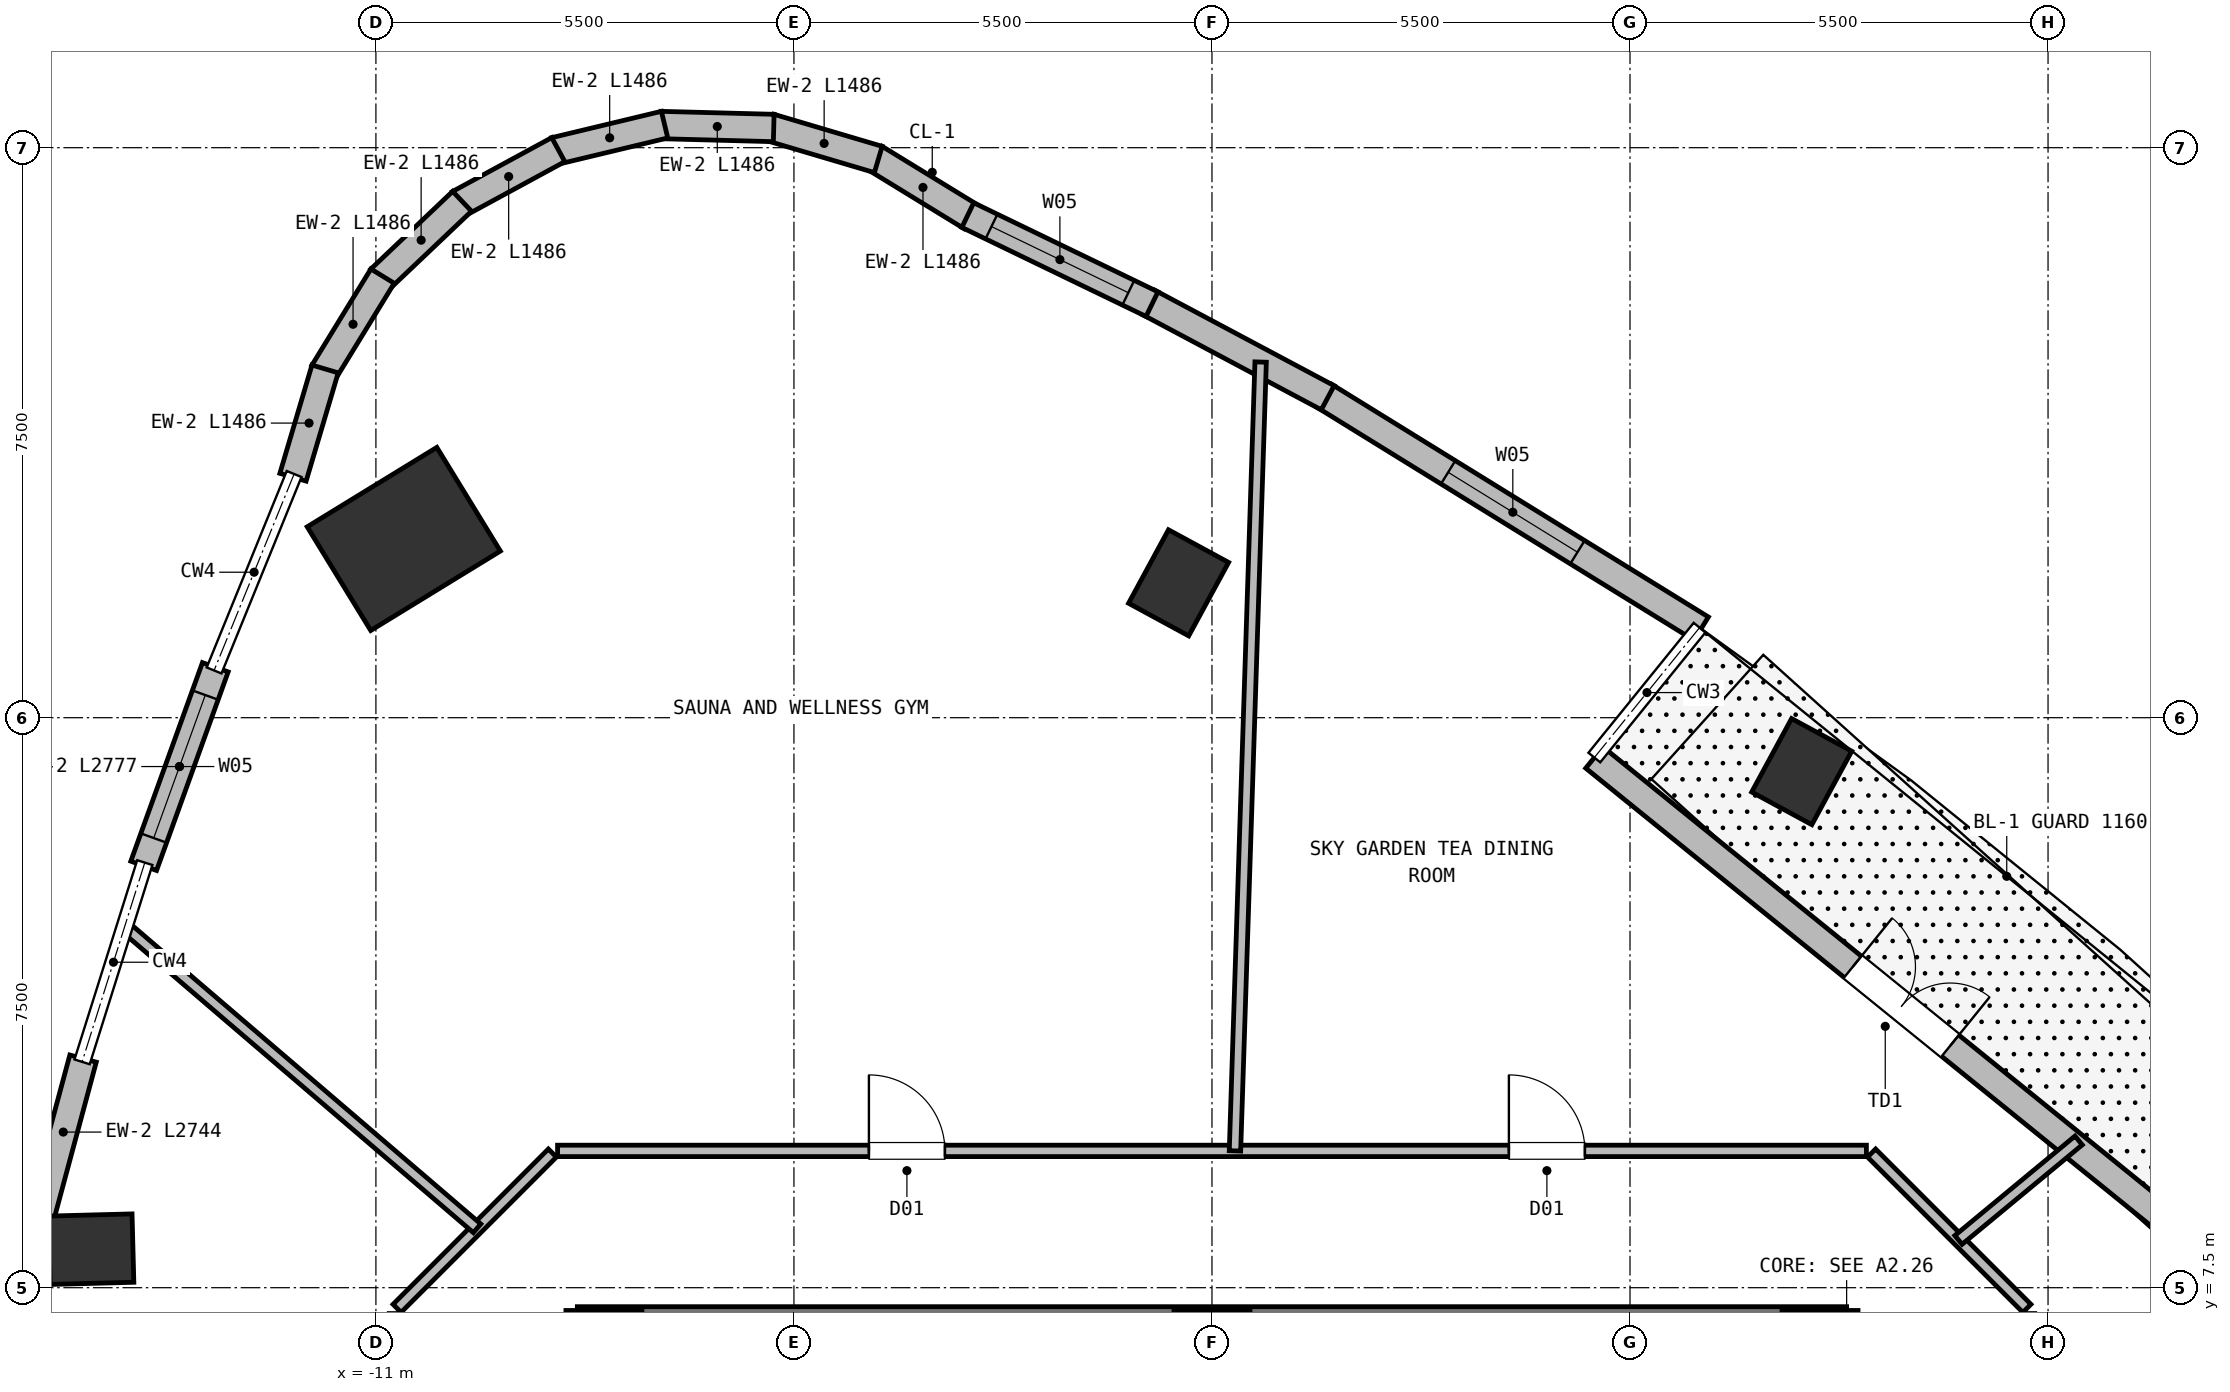
"""IFC4 building model, lengths in metres.
Left out: names, types, materials, properties, quantities, classifications, styles, units other than length and angle.
Written with IfcOpenShell. Run it as: python <this file> out.ifc"""

import sys

from ifc_helpers import new_model, si_unit, direction, frame, frame_2d, origin, origin_2d, place, context, subcontext, project, spatial, rectangle, extrude, element, fill, save


model = new_model("IFC4")
c1 = context("Model", 3, precision=1e-05, world=origin(), true_north=direction((0.0, 1.0)))
c2 = subcontext(c1, "Body", "Model", "MODEL_VIEW")
j1 = project(units=[si_unit("LENGTHUNIT", "METRE"), si_unit("PLANEANGLEUNIT", "RADIAN")], contexts=[c1])
p1 = place(None, origin())
s1 = spatial("IfcSite", under=j1, at=p1, CompositionType="ELEMENT")
p2 = place(p1, origin())
s2 = spatial("IfcBuilding", under=s1, at=p2, CompositionType="ELEMENT")
p3 = place(p2, frame((0.0, 0.0, 92.75)))
s3 = spatial("IfcBuildingStorey", under=s2, at=p3, CompositionType="ELEMENT", Elevation=92.75)
for number, where, z_axis, x_axis in (
    (1, (8.0, 6.6, 0.0), (0.0, 0.0, 1.0), (1.0, 0.0, 0.0)),
    (2, (0.0, 6.6, 0.0), (0.0, 0.0, 1.0), (1.0, 0.0, 0.0)),
    (3, (-8.0, 6.6, 0.0), (0.0, 0.0, 1.0), (1.0, 0.0, 0.0)),
):
    element("IfcColumn", number, at=place(p3, frame(where, z_axis=z_axis, x_axis=x_axis)), inside=s3, PredefinedType="COLUMN", context=c2, shape_type="SweptSolid", body=[
        extrude(rectangle(XDim=1.0, YDim=1.2, at=origin_2d()), origin(), (0.0, 0.0, 1.0), 4.5),
    ])
p4 = place(p3, frame((-8.35, 6.95, 0.0), z_axis=(0.0, 0.0, 1.0), x_axis=(1.0, 0.0, 0.0)))
e4 = element("IfcWall", 4, at=p4, inside=s3, PredefinedType="SHEAR", context=c2, shape_type="SweptSolid", body=[
    extrude(rectangle(XDim=16.7, YDim=0.6, at=frame_2d((8.35, 0.0))), origin(), (0.0, 0.0, 1.0), 4.25),
])
p5 = place(p3, frame((-10.633, 17.352, 0.0), z_axis=(0.0, 0.0, 1.0), x_axis=(-0.522498564716, 0.852640164354, 0.0)))
e5 = element("IfcColumn", 5, at=p5, inside=s3, PredefinedType="COLUMN", context=c2, shape_type="SweptSolid", body=[
    extrude(rectangle(XDim=1.6, YDim=2.0, at=origin_2d()), origin(), (0.0, 0.0, 1.0), 4.5),
])
for number, where, z_axis, x_axis in (
    (6, (-14.747, 8.007, 0.0), (0.0, 0.0, 1.0), (-0.026, 1.0, 0.0)),
    (7, (7.759, 14.29, 0.0), (0.0, 0.0, 1.0), (-0.879, 0.477, 0.0)),
    (8, (-0.439, 16.774, 0.0), (0.0, 0.0, 1.0), (-0.879, 0.477, 0.0)),
):
    element("IfcColumn", number, at=place(p3, frame(where, z_axis=z_axis, x_axis=x_axis)), inside=s3, PredefinedType="COLUMN", context=c2, shape_type="SweptSolid", body=[
        extrude(rectangle(XDim=0.9, YDim=1.1, at=origin_2d()), origin(), (0.0, 0.0, 1.0), 4.5),
    ])
p6 = place(p3, frame((5.031, 14.476, 0.0), z_axis=(0.0, 0.0, 1.0), x_axis=(0.777144818157, -0.629321802905, 0.0)))
e9 = element("IfcWall", 9, at=p6, inside=s3, PredefinedType="SOLIDWALL", context=c2, shape_type="SweptSolid", body=[
    extrude(rectangle(XDim=10.4, YDim=0.36, at=frame_2d((5.2, 0.0))), origin(), (0.0, 0.0, 1.0), 4.25),
])
p7 = place(p6, frame((4.375, 0.0, 0.0)))
e10 = element("IfcOpeningElement", 10, at=p7, cuts=e9, PredefinedType="OPENING", context=c2, shape_type="SweptSolid", body=[
    extrude(rectangle(XDim=1.65, YDim=2.25, at=frame_2d((0.825, 1.125))), frame((0.0, 0.19, 0.0), z_axis=(0.0, -1.0, 0.0), x_axis=(1.0, 0.0, 0.0)), (0.0, 0.0, 1.0), 0.38),
])
for number, where, z_axis, x_axis in (
    (11, (-4.436, 22.365, 0.0), (0.0, 0.0, 1.0), (0.853, -0.523, 0.0)),
    (12, (-5.815, 22.767, 0.0), (0.0, 0.0, 1.0), (0.959, -0.284, 0.0)),
):
    element("IfcWall", number, at=place(p3, frame(where, z_axis=z_axis, x_axis=x_axis)), inside=s3, PredefinedType="SOLIDWALL", context=c2, shape_type="SweptSolid", body=[
        extrude(rectangle(XDim=1.486, YDim=0.36, at=frame_2d((0.743, 0.0))), origin(), (0.0, 0.0, 1.0), 4.25),
    ])
p8 = place(p3, frame((-7.251, 22.798, 0.0), z_axis=(0.0, 0.0, 1.0), x_axis=(0.999658566483, -0.026129494011, 0.0)))
e13 = element("IfcWall", 13, at=p8, inside=s3, PredefinedType="SOLIDWALL", context=c2, shape_type="SweptSolid", body=[
    extrude(rectangle(XDim=1.486, YDim=0.36, at=frame_2d((0.743, 0.0))), origin(), (0.0, 0.0, 1.0), 4.25),
])
p9 = place(p3, frame((-8.647, 22.457, 0.0), z_axis=(0.0, 0.0, 1.0), x_axis=(0.972399232605, 0.233323235941, 0.0)))
e14 = element("IfcWall", 14, at=p9, inside=s3, PredefinedType="SOLIDWALL", context=c2, shape_type="SweptSolid", body=[
    extrude(rectangle(XDim=1.486, YDim=0.36, at=frame_2d((0.743, 0.0))), origin(), (0.0, 0.0, 1.0), 4.25),
])
p10 = place(p3, frame((-9.906, 21.765, 0.0), z_axis=(0.0, 0.0, 1.0), x_axis=(0.878867212286, 0.477066476677, 0.0)))
e15 = element("IfcWall", 15, at=p10, inside=s3, PredefinedType="SOLIDWALL", context=c2, shape_type="SweptSolid", body=[
    extrude(rectangle(XDim=1.486, YDim=0.36, at=frame_2d((0.743, 0.0))), origin(), (0.0, 0.0, 1.0), 4.25),
])
for number, where, z_axis, x_axis in (
    (16, (-10.944, 20.771, 0.0), (0.0, 0.0, 1.0), (0.725, 0.688, 0.0)),
    (17, (-11.689, 19.543, 0.0), (0.0, 0.0, 1.0), (0.523, 0.853, 0.0)),
    (18, (-12.091, 18.164, 0.0), (0.0, 0.0, 1.0), (0.284, 0.959, 0.0)),
):
    element("IfcWall", number, at=place(p3, frame(where, z_axis=z_axis, x_axis=x_axis)), inside=s3, PredefinedType="SOLIDWALL", context=c2, shape_type="SweptSolid", body=[
        extrude(rectangle(XDim=1.486, YDim=0.36, at=frame_2d((0.743, 0.0))), origin(), (0.0, 0.0, 1.0), 4.25),
    ])
p11 = place(p3, frame((-14.055, 13.051, 0.0), z_axis=(0.0, 0.0, 1.0), x_axis=(0.339208104653, 0.940711359418, 0.0)))
e19 = element("IfcWall", 19, at=p11, inside=s3, PredefinedType="SOLIDWALL", context=c2, shape_type="SweptSolid", body=[
    extrude(rectangle(XDim=2.777, YDim=0.36, at=frame_2d((1.389, 0.0))), origin(), (0.0, 0.0, 1.0), 4.25),
])
p12 = place(p11, frame((0.389, 0.0, 0.72)))
e20 = element("IfcOpeningElement", 20, at=p12, cuts=e19, PredefinedType="OPENING", context=c2, shape_type="SweptSolid", body=[
    extrude(rectangle(XDim=2.0, YDim=2.15, at=frame_2d((1.0, 1.075))), frame((0.0, 0.19, 0.0), z_axis=(0.0, -1.0, 0.0), x_axis=(1.0, 0.0, 0.0)), (0.0, 0.0, 1.0), 0.38),
])
p13 = place(p3, frame((-15.566, 7.865, 0.0), z_axis=(0.0, 0.0, 1.0), x_axis=(0.259976664172, 0.965614899474, 0.0)))
e21 = element("IfcWall", 21, at=p13, inside=s3, PredefinedType="SOLIDWALL", context=c2, shape_type="SweptSolid", body=[
    extrude(rectangle(XDim=2.744, YDim=0.36, at=frame_2d((1.372, 0.0))), origin(), (0.0, 0.0, 1.0), 4.25),
])
p14 = place(p3, frame((1.479, 19.235, 0.0), z_axis=(0.0, 0.0, 1.0), x_axis=(0.85074785703, -0.525574051642, 0.0)))
e22 = element("IfcWall", 22, at=p14, inside=s3, PredefinedType="SOLIDWALL", context=c2, shape_type="SweptSolid", body=[
    extrude(rectangle(XDim=5.827, YDim=0.36, at=frame_2d((2.914, 0.0))), origin(), (0.0, 0.0, 1.0), 4.25),
])
p15 = place(p14, frame((1.914, 0.0, 0.72)))
e23 = element("IfcOpeningElement", 23, at=p15, cuts=e22, PredefinedType="OPENING", context=c2, shape_type="SweptSolid", body=[
    extrude(rectangle(XDim=2.0, YDim=2.15, at=frame_2d((1.0, 1.075))), frame((0.0, 0.19, 0.0), z_axis=(0.0, -1.0, 0.0), x_axis=(1.0, 0.0, 0.0)), (0.0, 0.0, 1.0), 0.38),
])
p16 = place(p3, frame((-0.834, 20.464, 0.0), z_axis=(0.0, 0.0, 1.0), x_axis=(0.882722285875, -0.469895058519, 0.0)))
e24 = element("IfcWall", 24, at=p16, inside=s3, PredefinedType="SOLIDWALL", context=c2, shape_type="SweptSolid", body=[
    extrude(rectangle(XDim=2.669, YDim=0.36, at=frame_2d((1.335, 0.0))), origin(), (0.0, 0.0, 1.0), 4.25),
])
p17 = place(p3, frame((-3.213, 21.613, 0.0), z_axis=(0.0, 0.0, 1.0), x_axis=(0.900333552313, -0.435200522265, 0.0)))
e25 = element("IfcWall", 25, at=p17, inside=s3, PredefinedType="SOLIDWALL", context=c2, shape_type="SweptSolid", body=[
    extrude(rectangle(XDim=2.692, YDim=0.36, at=frame_2d((1.346, 0.0))), origin(), (0.0, 0.0, 1.0), 4.25),
])
p18 = place(p17, frame((0.346, 0.0, 0.72)))
e26 = element("IfcOpeningElement", 26, at=p18, cuts=e25, PredefinedType="OPENING", context=c2, shape_type="SweptSolid", body=[
    extrude(rectangle(XDim=2.0, YDim=2.15, at=frame_2d((1.0, 1.075))), frame((0.0, 0.19, 0.0), z_axis=(0.0, -1.0, 0.0), x_axis=(1.0, 0.0, 0.0)), (0.0, 0.0, 1.0), 0.38),
])
p19 = place(p3, frame((8.678, 9.272, 0.0), z_axis=(0.0, 0.0, 1.0), x_axis=(0.707106781187, -0.707106781187, 0.0)))
e27 = element("IfcWall", 27, at=p19, inside=s3, PredefinedType="PARTITIONING", context=c2, shape_type="SweptSolid", body=[
    extrude(rectangle(XDim=2.89, YDim=0.15, at=frame_2d((1.445, 0.0))), origin(), (0.0, 0.0, 1.0), 4.25),
])
p20 = place(p3, frame((-8.61, 9.3, 0.0), z_axis=(0.0, 0.0, 1.0), x_axis=(1.0, 0.0, 0.0)))
e28 = element("IfcWall", 28, at=p20, inside=s3, PredefinedType="PARTITIONING", context=c2, shape_type="SweptSolid", body=[
    extrude(rectangle(XDim=17.22, YDim=0.15, at=frame_2d((8.61, 0.0))), origin(), (0.0, 0.0, 1.0), 4.25),
])
p21 = place(p20, frame((12.516, 0.0, 0.0)))
e29 = element("IfcOpeningElement", 29, at=p21, cuts=e28, PredefinedType="OPENING", context=c2, shape_type="SweptSolid", body=[
    extrude(rectangle(XDim=1.0, YDim=2.15, at=frame_2d((0.5, 1.075))), frame((0.0, 0.085, 0.0), z_axis=(0.0, -1.0, 0.0), x_axis=(1.0, 0.0, 0.0)), (0.0, 0.0, 1.0), 0.17),
])
p22 = place(p20, frame((4.096, 0.0, 0.0)))
e30 = element("IfcOpeningElement", 30, at=p22, cuts=e28, PredefinedType="OPENING", context=c2, shape_type="SweptSolid", body=[
    extrude(rectangle(XDim=1.0, YDim=2.15, at=frame_2d((0.5, 1.075))), frame((0.0, 0.085, 0.0), z_axis=(0.0, -1.0, 0.0), x_axis=(1.0, 0.0, 0.0)), (0.0, 0.0, 1.0), 0.17),
])
p23 = place(p3, frame((-10.722, 7.228, 0.0), z_axis=(0.0, 0.0, 1.0), x_axis=(0.707106781187, 0.707106781187, 0.0)))
e31 = element("IfcWall", 31, at=p23, inside=s3, PredefinedType="PARTITIONING", context=c2, shape_type="SweptSolid", body=[
    extrude(rectangle(XDim=2.89, YDim=0.15, at=frame_2d((1.445, 0.0))), origin(), (0.0, 0.0, 1.0), 4.25),
])
p24 = place(p3, frame((9.821, 8.129, 0.0), z_axis=(0.0, 0.0, 1.0), x_axis=(0.770372154274, 0.637594498031, 0.0)))
e32 = element("IfcWall", 32, at=p24, inside=s3, PredefinedType="PARTITIONING", context=c2, shape_type="SweptSolid", body=[
    extrude(rectangle(XDim=2.052, YDim=0.15, at=frame_2d((1.026, 0.0))), origin(), (0.0, 0.0, 1.0), 4.25),
])
p25 = place(p3, frame((0.302, 9.3, 0.0), z_axis=(0.0, 0.0, 1.0), x_axis=(0.032513261834, 0.999471304143, 0.0)))
e33 = element("IfcWall", 33, at=p25, inside=s3, PredefinedType="PARTITIONING", context=c2, shape_type="SweptSolid", body=[
    extrude(rectangle(XDim=10.385, YDim=0.15, at=frame_2d((5.192, 0.0))), origin(), (0.0, 0.0, 1.0), 4.25),
])
p26 = place(p3, frame((-9.669, 8.281, 0.0), z_axis=(0.0, 0.0, 1.0), x_axis=(-0.75949368275, 0.650514677669, 0.0)))
e34 = element("IfcWall", 34, at=p26, inside=s3, PredefinedType="PARTITIONING", context=c2, shape_type="SweptSolid", body=[
    extrude(rectangle(XDim=6.105, YDim=0.15, at=frame_2d((3.052, 0.0))), origin(), (0.0, 0.0, 1.0), 4.25),
])
p27 = place(p7, origin())
e35 = element("IfcDoor", 35, at=p27, inside=s3, OperationType="DOUBLE_DOOR_SINGLE_SWING", PredefinedType="DOOR", context=c2, shape_type="SweptSolid", body=[
    extrude(rectangle(XDim=1.65, YDim=2.25, at=frame_2d((0.825, 1.125))), frame((0.0, 0.025, 0.0), z_axis=(0.0, -1.0, 0.0), x_axis=(1.0, 0.0, 0.0)), (0.0, 0.0, 1.0), 0.05),
])
fill(e10, e35)
p28 = place(p12, origin())
e36 = element("IfcWindow", 36, at=p28, inside=s3, PartitioningType="SINGLE_PANEL", PredefinedType="WINDOW", context=c2, shape_type="SweptSolid", body=[
    extrude(rectangle(XDim=2.0, YDim=2.15, at=frame_2d((1.0, 1.075))), frame((0.0, 0.03, 0.0), z_axis=(0.0, -1.0, 0.0), x_axis=(1.0, 0.0, 0.0)), (0.0, 0.0, 1.0), 0.06),
])
fill(e20, e36)
p29 = place(p15, origin())
e37 = element("IfcWindow", 37, at=p29, inside=s3, PartitioningType="SINGLE_PANEL", PredefinedType="WINDOW", context=c2, shape_type="SweptSolid", body=[
    extrude(rectangle(XDim=2.0, YDim=2.15, at=frame_2d((1.0, 1.075))), frame((0.0, 0.03, 0.0), z_axis=(0.0, -1.0, 0.0), x_axis=(1.0, 0.0, 0.0)), (0.0, 0.0, 1.0), 0.06),
])
fill(e23, e37)
p30 = place(p18, origin())
e38 = element("IfcWindow", 38, at=p30, inside=s3, PartitioningType="SINGLE_PANEL", PredefinedType="WINDOW", context=c2, shape_type="SweptSolid", body=[
    extrude(rectangle(XDim=2.0, YDim=2.15, at=frame_2d((1.0, 1.075))), frame((0.0, 0.03, 0.0), z_axis=(0.0, -1.0, 0.0), x_axis=(1.0, 0.0, 0.0)), (0.0, 0.0, 1.0), 0.06),
])
fill(e26, e38)
p31 = place(p21, origin())
e39 = element("IfcDoor", 39, at=p31, inside=s3, OperationType="SINGLE_SWING_LEFT", PredefinedType="DOOR", context=c2, shape_type="SweptSolid", body=[
    extrude(rectangle(XDim=1.0, YDim=2.15, at=frame_2d((0.5, 1.075))), frame((0.0, 0.025, 0.0), z_axis=(0.0, -1.0, 0.0), x_axis=(1.0, 0.0, 0.0)), (0.0, 0.0, 1.0), 0.05),
])
fill(e29, e39)
p32 = place(p22, origin())
e40 = element("IfcDoor", 40, at=p32, inside=s3, OperationType="SINGLE_SWING_LEFT", PredefinedType="DOOR", context=c2, shape_type="SweptSolid", body=[
    extrude(rectangle(XDim=1.0, YDim=2.15, at=frame_2d((0.5, 1.075))), frame((0.0, 0.025, 0.0), z_axis=(0.0, -1.0, 0.0), x_axis=(1.0, 0.0, 0.0)), (0.0, 0.0, 1.0), 0.05),
])
fill(e30, e40)
save(model, sys.argv[1])
